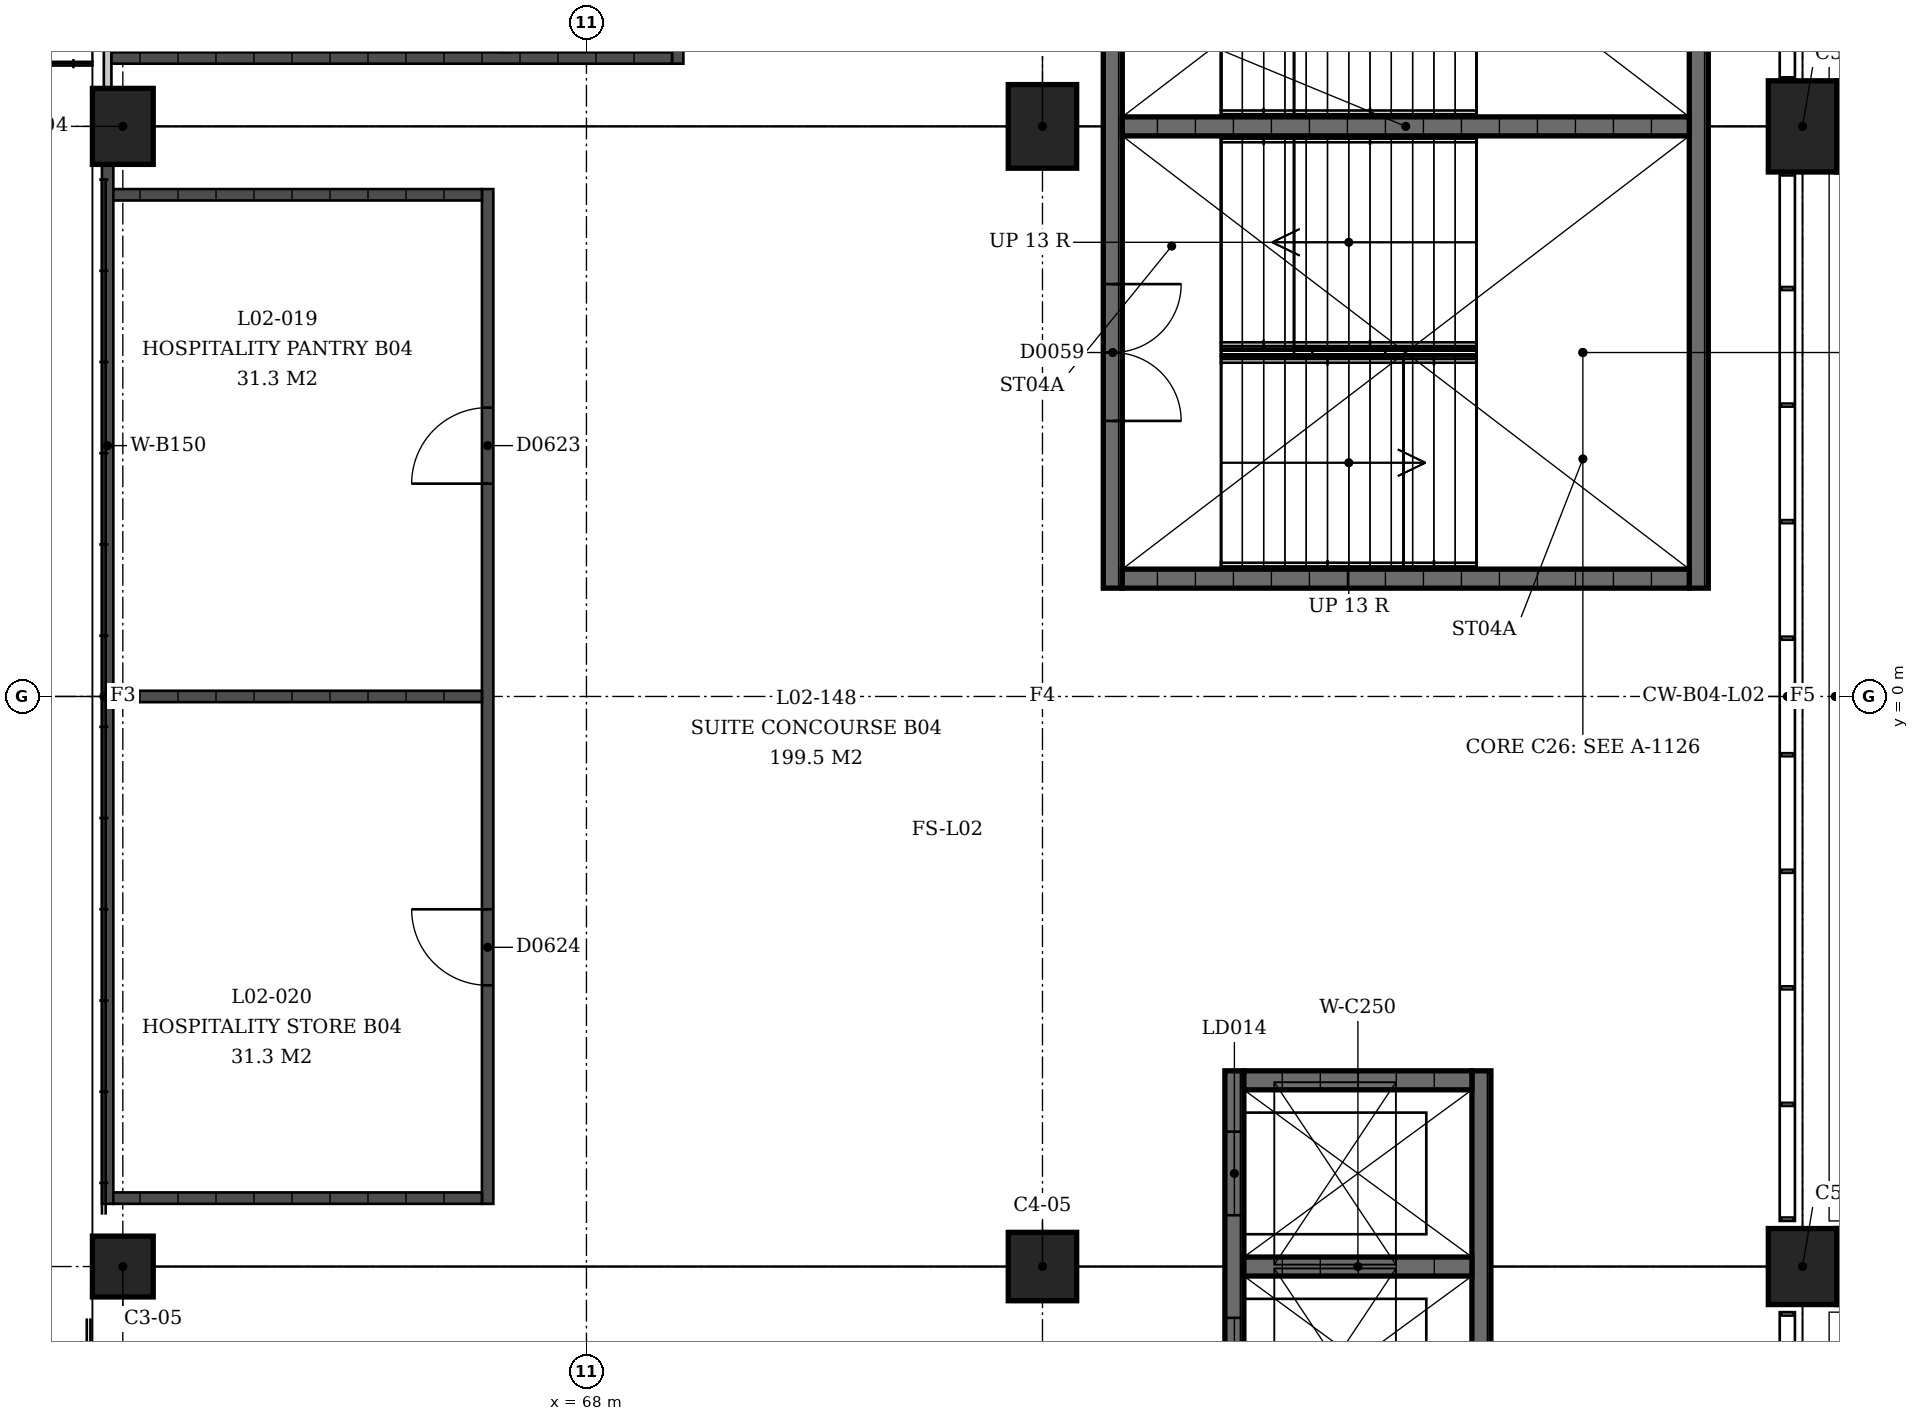
"""IFC4 building model, lengths in metres.
Left out: names, types, materials, properties, quantities, classifications, styles, units other than length and angle.
Written with IfcOpenShell. Run it as: python <this file> out.ifc"""

import sys

from ifc_helpers import new_model, si_unit, direction, frame, frame_2d, origin, origin_2d, place, context, subcontext, project, spatial, rectangle, extrude, element, fill, save


model = new_model("IFC4")
c1 = context("Model", 3, precision=1e-05, world=origin(), true_north=direction((0.0, 1.0)))
c2 = subcontext(c1, "Body", "Model", "MODEL_VIEW")
j1 = project(units=[si_unit("LENGTHUNIT", "METRE"), si_unit("PLANEANGLEUNIT", "RADIAN")], contexts=[c1])
p1 = place(None, origin())
s1 = spatial("IfcSite", under=j1, at=p1, CompositionType="ELEMENT")
p2 = place(p1, origin())
s2 = spatial("IfcBuilding", under=s1, at=p2, CompositionType="ELEMENT")
p3 = place(p2, frame((0.0, 0.0, 9.0)))
s3 = spatial("IfcBuildingStorey", under=s2, at=p3, CompositionType="ELEMENT", Elevation=9.0)
p4 = place(p3, frame((61.9, 7.5, 0.0), z_axis=(0.0, 0.0, 1.0), x_axis=(0.0, 1.0, 0.0)))
e1 = element("IfcColumn", 1, at=p4, inside=s3, PredefinedType="COLUMN", context=c2, shape_type="SweptSolid", body=[
    extrude(rectangle(XDim=1.0, YDim=0.8, at=origin_2d()), origin(), (0.0, 0.0, 1.0), 4.5),
])
p5 = place(p3, frame((74.0, 7.5, 0.0), z_axis=(0.0, 0.0, 1.0), x_axis=(0.0, 1.0, 0.0)))
e2 = element("IfcColumn", 2, at=p5, inside=s3, PredefinedType="COLUMN", context=c2, shape_type="SweptSolid", body=[
    extrude(rectangle(XDim=1.1, YDim=0.9, at=origin_2d()), origin(), (0.0, 0.0, 1.0), 4.5),
])
p6 = place(p3, frame((84.0, 7.5, 0.0), z_axis=(0.0, 0.0, 1.0), x_axis=(0.0, 1.0, 0.0)))
e3 = element("IfcColumn", 3, at=p6, inside=s3, PredefinedType="COLUMN", context=c2, shape_type="SweptSolid", body=[
    extrude(rectangle(XDim=1.2, YDim=0.9, at=origin_2d()), origin(), (0.0, 0.0, 1.0), 4.5),
])
p7 = place(p3, frame((61.9, -7.5, 0.0), z_axis=(0.0, 0.0, 1.0), x_axis=(0.0, 1.0, 0.0)))
e4 = element("IfcColumn", 4, at=p7, inside=s3, PredefinedType="COLUMN", context=c2, shape_type="SweptSolid", body=[
    extrude(rectangle(XDim=0.8, YDim=0.8, at=origin_2d()), origin(), (0.0, 0.0, 1.0), 4.5),
])
p8 = place(p3, frame((74.0, -7.5, 0.0), z_axis=(0.0, 0.0, 1.0), x_axis=(0.0, 1.0, 0.0)))
e5 = element("IfcColumn", 5, at=p8, inside=s3, PredefinedType="COLUMN", context=c2, shape_type="SweptSolid", body=[
    extrude(rectangle(XDim=0.9, YDim=0.9, at=origin_2d()), origin(), (0.0, 0.0, 1.0), 4.5),
])
p9 = place(p3, frame((84.0, -7.5, 0.0), z_axis=(0.0, 0.0, 1.0), x_axis=(0.0, 1.0, 0.0)))
e6 = element("IfcColumn", 6, at=p9, inside=s3, PredefinedType="COLUMN", context=c2, shape_type="SweptSolid", body=[
    extrude(rectangle(XDim=1.0, YDim=0.9, at=origin_2d()), origin(), (0.0, 0.0, 1.0), 4.5),
])
p10 = place(p3, frame((74.925, 1.425, 0.0), z_axis=(0.0, 0.0, 1.0), x_axis=(0.0, 1.0, 0.0)))
e7 = element("IfcWall", 7, at=p10, inside=s3, PredefinedType="SHEAR", context=c2, shape_type="SweptSolid", body=[
    extrude(rectangle(XDim=12.15, YDim=0.25, at=frame_2d((6.075, 0.0))), origin(), (0.0, 0.0, 1.0), 4.09),
])
p11 = place(p10, frame((2.2, 0.0, 0.0)))
e8 = element("IfcOpeningElement", 8, at=p11, cuts=e7, PredefinedType="OPENING", context=c2, shape_type="SweptSolid", body=[
    extrude(rectangle(XDim=1.8, YDim=2.1, at=frame_2d((0.9, 1.05))), frame((0.0, 0.125, 0.0), z_axis=(0.0, -1.0, 0.0), x_axis=(1.0, 0.0, 0.0)), (0.0, 0.0, 1.0), 0.25),
])
p12 = place(p10, frame((8.15, 0.0, 0.0)))
e9 = element("IfcOpeningElement", 9, at=p12, cuts=e7, PredefinedType="OPENING", context=c2, shape_type="SweptSolid", body=[
    extrude(rectangle(XDim=1.8, YDim=2.1, at=frame_2d((0.9, 1.05))), frame((0.0, 0.125, 0.0), z_axis=(0.0, -1.0, 0.0), x_axis=(1.0, 0.0, 0.0)), (0.0, 0.0, 1.0), 0.25),
])
p13 = place(p3, frame((82.635, 1.425, 0.0), z_axis=(0.0, 0.0, 1.0), x_axis=(0.0, 1.0, 0.0)))
e10 = element("IfcWall", 10, at=p13, inside=s3, PredefinedType="SHEAR", context=c2, shape_type="SweptSolid", body=[
    extrude(rectangle(XDim=12.15, YDim=0.25, at=frame_2d((6.075, 0.0))), origin(), (0.0, 0.0, 1.0), 4.09),
])
for number, where, z_axis, x_axis in (
    (11, (75.05, 1.55, 0.0), (0.0, 0.0, 1.0), (1.0, 0.0, 0.0)),
    (12, (75.05, 7.5, 0.0), (0.0, 0.0, 1.0), (1.0, 0.0, 0.0)),
):
    element("IfcWall", number, at=place(p3, frame(where, z_axis=z_axis, x_axis=x_axis)), inside=s3, PredefinedType="SHEAR", context=c2, shape_type="SweptSolid", body=[
        extrude(rectangle(XDim=7.46, YDim=0.25, at=frame_2d((3.73, 0.0))), origin(), (0.0, 0.0, 1.0), 4.09),
    ])
p14 = place(p3, frame((76.525, -10.075, 0.0), z_axis=(0.0, 0.0, 1.0), x_axis=(0.0, 1.0, 0.0)))
e13 = element("IfcWall", 13, at=p14, inside=s3, PredefinedType="SHEAR", context=c2, shape_type="SweptSolid", body=[
    extrude(rectangle(XDim=5.15, YDim=0.25, at=frame_2d((2.575, 0.0))), origin(), (0.0, 0.0, 1.0), 4.09),
])
p15 = place(p14, frame((0.8, 0.0, 0.0)))
e14 = element("IfcOpeningElement", 14, at=p15, cuts=e13, PredefinedType="OPENING", context=c2, shape_type="SweptSolid", body=[
    extrude(rectangle(XDim=1.1, YDim=2.1, at=frame_2d((0.55, 1.05))), frame((0.0, 0.125, 0.0), z_axis=(0.0, -1.0, 0.0), x_axis=(1.0, 0.0, 0.0)), (0.0, 0.0, 1.0), 0.25),
])
p16 = place(p14, frame((3.25, 0.0, 0.0)))
e15 = element("IfcOpeningElement", 15, at=p16, cuts=e13, PredefinedType="OPENING", context=c2, shape_type="SweptSolid", body=[
    extrude(rectangle(XDim=1.1, YDim=2.1, at=frame_2d((0.55, 1.05))), frame((0.0, 0.125, 0.0), z_axis=(0.0, -1.0, 0.0), x_axis=(1.0, 0.0, 0.0)), (0.0, 0.0, 1.0), 0.25),
])
p17 = place(p3, frame((79.775, -10.075, 0.0), z_axis=(0.0, 0.0, 1.0), x_axis=(0.0, 1.0, 0.0)))
e16 = element("IfcWall", 16, at=p17, inside=s3, PredefinedType="SHEAR", context=c2, shape_type="SweptSolid", body=[
    extrude(rectangle(XDim=5.15, YDim=0.25, at=frame_2d((2.575, 0.0))), origin(), (0.0, 0.0, 1.0), 4.09),
])
for number, where, z_axis, x_axis in (
    (17, (76.65, -5.05, 0.0), (0.0, 0.0, 1.0), (1.0, 0.0, 0.0)),
    (18, (76.65, -7.5, 0.0), (0.0, 0.0, 1.0), (1.0, 0.0, 0.0)),
):
    element("IfcWall", number, at=place(p3, frame(where, z_axis=z_axis, x_axis=x_axis)), inside=s3, PredefinedType="SHEAR", context=c2, shape_type="SweptSolid", body=[
        extrude(rectangle(XDim=3.0, YDim=0.25, at=frame_2d((1.5, 0.0))), origin(), (0.0, 0.0, 1.0), 4.09),
    ])
p18 = place(p3, frame((61.7, 8.0, 0.0), z_axis=(0.0, 0.0, 1.0), x_axis=(0.0, 1.0, 0.0)))
e19 = element("IfcWall", 19, at=p18, inside=s3, PredefinedType="PARTITIONING", context=c2, shape_type="SweptSolid", body=[
    extrude(rectangle(XDim=12.625, YDim=0.1, at=frame_2d((6.312, 0.0))), origin(), (0.0, 0.0, 1.0), 3.0),
])
p19 = place(p18, frame((2.538, 0.0, 0.0)))
e20 = element("IfcOpeningElement", 20, at=p19, cuts=e19, PredefinedType="OPENING", context=c2, shape_type="SweptSolid", body=[
    extrude(rectangle(XDim=1.8, YDim=2.1, at=frame_2d((0.9, 1.05))), frame((0.0, 0.05, 0.0), z_axis=(0.0, -1.0, 0.0), x_axis=(1.0, 0.0, 0.0)), (0.0, 0.0, 1.0), 0.1),
])
p20 = place(p18, frame((8.613, 0.0, 0.0)))
e21 = element("IfcOpeningElement", 21, at=p20, cuts=e19, PredefinedType="OPENING", context=c2, shape_type="SweptSolid", body=[
    extrude(rectangle(XDim=1.8, YDim=2.1, at=frame_2d((0.9, 1.05))), frame((0.0, 0.05, 0.0), z_axis=(0.0, -1.0, 0.0), x_axis=(1.0, 0.0, 0.0)), (0.0, 0.0, 1.0), 0.1),
])
p21 = place(p3, frame((69.2, 8.325, 0.0), z_axis=(0.0, 0.0, 1.0), x_axis=(0.0, 1.0, 0.0)))
e22 = element("IfcWall", 22, at=p21, inside=s3, PredefinedType="SOLIDWALL", context=c2, shape_type="SweptSolid", body=[
    extrude(rectangle(XDim=12.3, YDim=0.15, at=frame_2d((6.15, 0.0))), origin(), (0.0, 0.0, 1.0), 3.0),
])
p22 = place(p21, frame((3.916, 0.0, 0.0)))
e23 = element("IfcOpeningElement", 23, at=p22, cuts=e22, PredefinedType="OPENING", context=c2, shape_type="SweptSolid", body=[
    extrude(rectangle(XDim=1.0, YDim=2.1, at=frame_2d((0.5, 1.05))), frame((0.0, 0.075, 0.0), z_axis=(0.0, -1.0, 0.0), x_axis=(1.0, 0.0, 0.0)), (0.0, 0.0, 1.0), 0.15),
])
p23 = place(p21, frame((9.991, 0.0, 0.0)))
e24 = element("IfcOpeningElement", 24, at=p23, cuts=e22, PredefinedType="OPENING", context=c2, shape_type="SweptSolid", body=[
    extrude(rectangle(XDim=1.0, YDim=2.1, at=frame_2d((0.5, 1.05))), frame((0.0, 0.075, 0.0), z_axis=(0.0, -1.0, 0.0), x_axis=(1.0, 0.0, 0.0)), (0.0, 0.0, 1.0), 0.15),
])
p24 = place(p3, frame((61.75, 8.4, 0.0), z_axis=(0.0, 0.0, 1.0), x_axis=(1.0, 0.0, 0.0)))
e25 = element("IfcWall", 25, at=p24, inside=s3, PredefinedType="SOLIDWALL", context=c2, shape_type="SweptSolid", body=[
    extrude(rectangle(XDim=7.375, YDim=0.15, at=frame_2d((3.688, 0.0))), origin(), (0.0, 0.0, 1.0), 3.0),
])
p25 = place(p3, frame((66.925, 8.475, 0.0), z_axis=(0.0, 0.0, 1.0), x_axis=(0.0, 1.0, 0.0)))
e26 = element("IfcWall", 26, at=p25, inside=s3, PredefinedType="PARTITIONING", context=c2, shape_type="SweptSolid", body=[
    extrude(rectangle(XDim=1.775, YDim=0.15, at=frame_2d((0.887, 0.0))), origin(), (0.0, 0.0, 1.0), 3.0),
])
p26 = place(p25, frame((0.363, 0.0, 0.0)))
e27 = element("IfcOpeningElement", 27, at=p26, cuts=e26, PredefinedType="OPENING", context=c2, shape_type="SweptSolid", body=[
    extrude(rectangle(XDim=0.9, YDim=2.1, at=frame_2d((0.45, 1.05))), frame((0.0, 0.075, 0.0), z_axis=(0.0, -1.0, 0.0), x_axis=(1.0, 0.0, 0.0)), (0.0, 0.0, 1.0), 0.15),
])
p27 = place(p3, frame((61.7, 7.0, 0.0), z_axis=(0.0, 0.0, 1.0), x_axis=(0.0, -1.0, 0.0)))
e28 = element("IfcWall", 28, at=p27, inside=s3, PredefinedType="SOLIDWALL", context=c2, shape_type="SweptSolid", body=[
    extrude(rectangle(XDim=13.675, YDim=0.15, at=frame_2d((6.837, 0.0))), origin(), (0.0, 0.0, 1.0), 3.0),
])
p28 = place(p3, frame((66.7, 6.675, 0.0), z_axis=(0.0, 0.0, 1.0), x_axis=(0.0, -1.0, 0.0)))
e29 = element("IfcWall", 29, at=p28, inside=s3, PredefinedType="SOLIDWALL", context=c2, shape_type="SweptSolid", body=[
    extrude(rectangle(XDim=13.35, YDim=0.15, at=frame_2d((6.675, 0.0))), origin(), (0.0, 0.0, 1.0), 3.0),
])
p29 = place(p28, frame((2.875, 0.0, 0.0)))
e30 = element("IfcOpeningElement", 30, at=p29, cuts=e29, PredefinedType="OPENING", context=c2, shape_type="SweptSolid", body=[
    extrude(rectangle(XDim=1.0, YDim=2.1, at=frame_2d((0.5, 1.05))), frame((0.0, 0.075, 0.0), z_axis=(0.0, -1.0, 0.0), x_axis=(1.0, 0.0, 0.0)), (0.0, 0.0, 1.0), 0.15),
])
p30 = place(p28, frame((9.475, 0.0, 0.0)))
e31 = element("IfcOpeningElement", 31, at=p30, cuts=e29, PredefinedType="OPENING", context=c2, shape_type="SweptSolid", body=[
    extrude(rectangle(XDim=1.0, YDim=2.1, at=frame_2d((0.5, 1.05))), frame((0.0, 0.075, 0.0), z_axis=(0.0, -1.0, 0.0), x_axis=(1.0, 0.0, 0.0)), (0.0, 0.0, 1.0), 0.15),
])
for number, where, z_axis, x_axis in (
    (32, (61.775, 6.6, 0.0), (0.0, 0.0, 1.0), (1.0, 0.0, 0.0)),
    (33, (61.775, 0.0, 0.0), (0.0, 0.0, 1.0), (1.0, 0.0, 0.0)),
    (34, (61.775, -6.6, 0.0), (0.0, 0.0, 1.0), (1.0, 0.0, 0.0)),
):
    element("IfcWall", number, at=place(p3, frame(where, z_axis=z_axis, x_axis=x_axis)), inside=s3, PredefinedType="SOLIDWALL", context=c2, shape_type="SweptSolid", body=[
        extrude(rectangle(XDim=4.85, YDim=0.15, at=frame_2d((2.425, 0.0))), origin(), (0.0, 0.0, 1.0), 3.0),
    ])
p31 = place(p11, origin())
e35 = element("IfcDoor", 35, at=p31, inside=s3, OperationType="DOUBLE_DOOR_SINGLE_SWING", PredefinedType="DOOR", context=c2, shape_type="SweptSolid", body=[
    extrude(rectangle(XDim=1.8, YDim=2.1, at=frame_2d((0.9, 1.05))), frame((0.0, 0.025, 0.0), z_axis=(0.0, -1.0, 0.0), x_axis=(1.0, 0.0, 0.0)), (0.0, 0.0, 1.0), 0.05),
])
fill(e8, e35)
p32 = place(p15, origin())
e36 = element("IfcDoor", 36, at=p32, inside=s3, OperationType="SLIDING_TO_LEFT", PredefinedType="DOOR", context=c2, shape_type="SweptSolid", body=[
    extrude(rectangle(XDim=1.1, YDim=2.1, at=frame_2d((0.55, 1.05))), frame((0.0, 0.025, 0.0), z_axis=(0.0, -1.0, 0.0), x_axis=(1.0, 0.0, 0.0)), (0.0, 0.0, 1.0), 0.05),
])
fill(e14, e36)
p33 = place(p16, origin())
e37 = element("IfcDoor", 37, at=p33, inside=s3, OperationType="SLIDING_TO_LEFT", PredefinedType="DOOR", context=c2, shape_type="SweptSolid", body=[
    extrude(rectangle(XDim=1.1, YDim=2.1, at=frame_2d((0.55, 1.05))), frame((0.0, 0.025, 0.0), z_axis=(0.0, -1.0, 0.0), x_axis=(1.0, 0.0, 0.0)), (0.0, 0.0, 1.0), 0.05),
])
fill(e15, e37)
p34 = place(p29, origin())
e38 = element("IfcDoor", 38, at=p34, inside=s3, OperationType="SINGLE_SWING_RIGHT", PredefinedType="DOOR", context=c2, shape_type="SweptSolid", body=[
    extrude(rectangle(XDim=1.0, YDim=2.1, at=frame_2d((0.5, 1.05))), frame((0.0, 0.025, 0.0), z_axis=(0.0, -1.0, 0.0), x_axis=(1.0, 0.0, 0.0)), (0.0, 0.0, 1.0), 0.05),
])
fill(e30, e38)
p35 = place(p30, origin())
e39 = element("IfcDoor", 39, at=p35, inside=s3, OperationType="SINGLE_SWING_LEFT", PredefinedType="DOOR", context=c2, shape_type="SweptSolid", body=[
    extrude(rectangle(XDim=1.0, YDim=2.1, at=frame_2d((0.5, 1.05))), frame((0.0, 0.025, 0.0), z_axis=(0.0, -1.0, 0.0), x_axis=(1.0, 0.0, 0.0)), (0.0, 0.0, 1.0), 0.05),
])
fill(e31, e39)
save(model, sys.argv[1])
